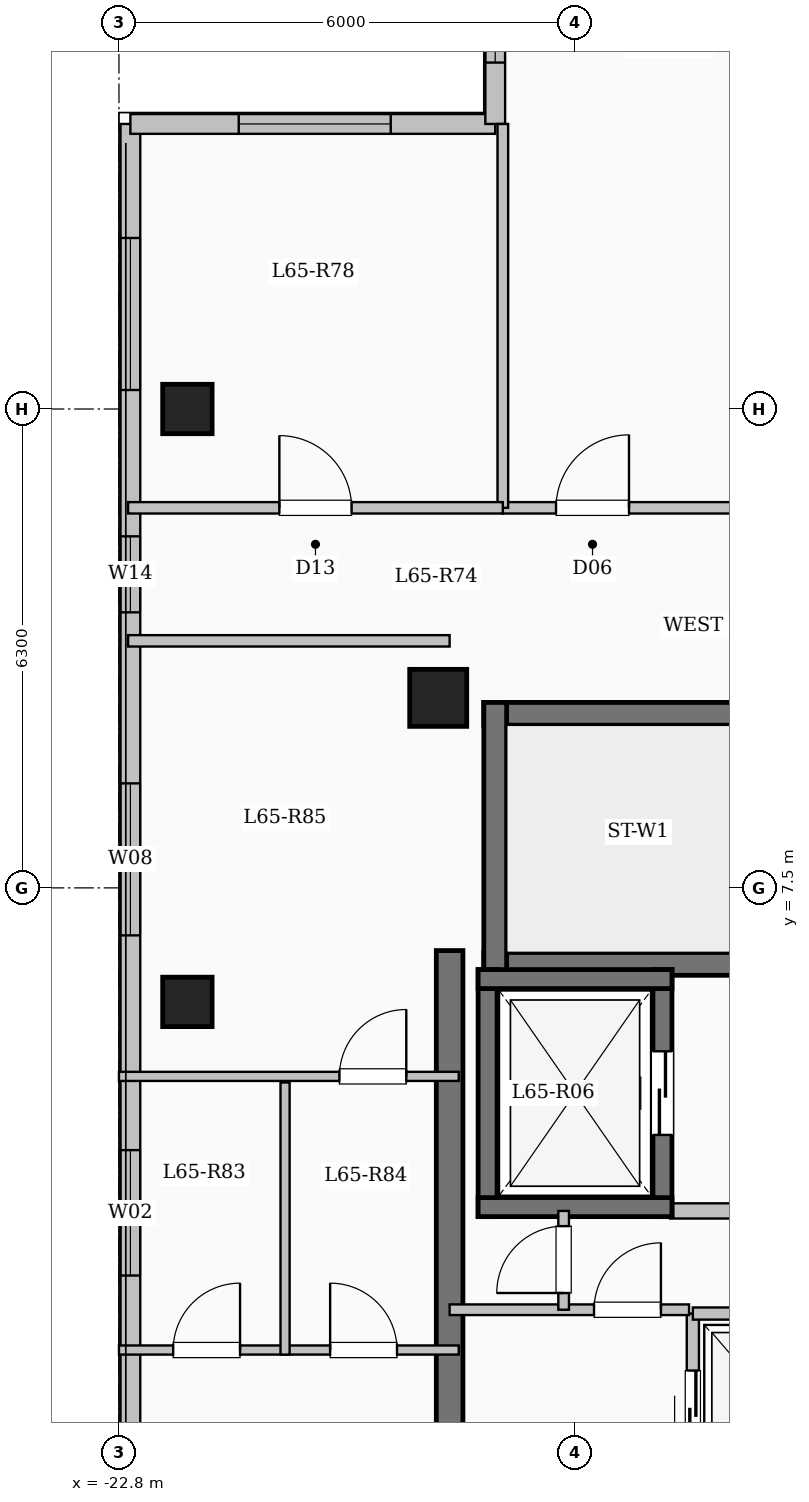
"""IFC4 building model, lengths in metres.
Left out: names, types, materials, properties, quantities, classifications, styles, units other than length and angle.
Written with IfcOpenShell. Run it as: python <this file> out.ifc"""

import sys

from ifc_helpers import new_model, si_unit, direction, frame, frame_2d, origin, origin_2d, place, context, subcontext, project, spatial, rectangle, extrude, element, fill, save


model = new_model("IFC4")
c1 = context("Model", 3, precision=1e-05, world=origin(), true_north=direction((0.0, 1.0)))
c2 = subcontext(c1, "Body", "Model", "MODEL_VIEW")
j1 = project(units=[si_unit("LENGTHUNIT", "METRE"), si_unit("PLANEANGLEUNIT", "RADIAN")], contexts=[c1])
p1 = place(None, origin())
s1 = spatial("IfcSite", under=j1, at=p1, CompositionType="ELEMENT")
p2 = place(p1, origin())
s2 = spatial("IfcBuilding", under=s1, at=p2, CompositionType="ELEMENT")
p3 = place(p2, frame((0.0, 0.0, 241.5)))
s3 = spatial("IfcBuildingStorey", under=s2, at=p3, CompositionType="ELEMENT", Elevation=241.5)
p4 = place(p3, frame((-18.6, 10.0, 0.0), z_axis=(0.0, 0.0, 1.0), x_axis=(1.0, 0.0, 0.0)))
e1 = element("IfcColumn", 1, at=p4, inside=s3, PredefinedType="COLUMN", context=c2, shape_type="SweptSolid", body=[
    extrude(rectangle(XDim=0.75, YDim=0.75, at=origin_2d()), origin(), (0.0, 0.0, 1.0), 3.35),
])
for number, where, z_axis, x_axis in (
    (2, (-21.9, 6.0, 0.0), (0.0, 0.0, 1.0), (1.0, 0.0, 0.0)),
    (3, (-21.9, 13.8, 0.0), (0.0, 0.0, 1.0), (1.0, 0.0, 0.0)),
):
    element("IfcColumn", number, at=place(p3, frame(where, z_axis=z_axis, x_axis=x_axis)), inside=s3, PredefinedType="COLUMN", context=c2, shape_type="SweptSolid", body=[
        extrude(rectangle(XDim=0.65, YDim=0.65, at=origin_2d()), origin(), (0.0, 0.0, 1.0), 3.35),
    ])
p5 = place(p3, frame((-22.65, -17.55, 0.0), z_axis=(0.0, 0.0, 1.0), x_axis=(0.0, 1.0, 0.0)))
e4 = element("IfcWall", 4, at=p5, inside=s3, PredefinedType="SOLIDWALL", context=c2, shape_type="SweptSolid", body=[
    extrude(rectangle(XDim=35.1, YDim=0.26, at=frame_2d((17.55, 0.0))), origin(), (0.0, 0.0, 1.0), 3.1),
])
p6 = place(p5, frame((2.975, 0.0, 0.9)))
e5 = element("IfcOpeningElement", 5, at=p6, cuts=e4, PredefinedType="OPENING", context=c2, shape_type="SweptSolid", body=[
    extrude(rectangle(XDim=2.2, YDim=1.75, at=frame_2d((1.1, 0.875))), frame((0.0, 0.14, 0.0), z_axis=(0.0, -1.0, 0.0), x_axis=(1.0, 0.0, 0.0)), (0.0, 0.0, 1.0), 0.28),
])
p7 = place(p5, frame((8.625, 0.0, 0.95)))
e6 = element("IfcOpeningElement", 6, at=p7, cuts=e4, PredefinedType="OPENING", context=c2, shape_type="SweptSolid", body=[
    extrude(rectangle(XDim=1.2, YDim=1.5, at=frame_2d((0.6, 0.75))), frame((0.0, 0.14, 0.0), z_axis=(0.0, -1.0, 0.0), x_axis=(1.0, 0.0, 0.0)), (0.0, 0.0, 1.0), 0.28),
])
p8 = place(p5, frame((13.55, 0.0, 0.9)))
e7 = element("IfcOpeningElement", 7, at=p8, cuts=e4, PredefinedType="OPENING", context=c2, shape_type="SweptSolid", body=[
    extrude(rectangle(XDim=2.2, YDim=1.75, at=frame_2d((1.1, 0.875))), frame((0.0, 0.14, 0.0), z_axis=(0.0, -1.0, 0.0), x_axis=(1.0, 0.0, 0.0)), (0.0, 0.0, 1.0), 0.28),
])
p9 = place(p5, frame((19.95, 0.0, 0.9)))
e8 = element("IfcOpeningElement", 8, at=p9, cuts=e4, PredefinedType="OPENING", context=c2, shape_type="SweptSolid", body=[
    extrude(rectangle(XDim=1.65, YDim=1.6, at=frame_2d((0.825, 0.8))), frame((0.0, 0.14, 0.0), z_axis=(0.0, -1.0, 0.0), x_axis=(1.0, 0.0, 0.0)), (0.0, 0.0, 1.0), 0.28),
])
p10 = place(p5, frame((24.425, 0.0, 0.9)))
e9 = element("IfcOpeningElement", 9, at=p10, cuts=e4, PredefinedType="OPENING", context=c2, shape_type="SweptSolid", body=[
    extrude(rectangle(XDim=2.0, YDim=1.7, at=frame_2d((1.0, 0.85))), frame((0.0, 0.14, 0.0), z_axis=(0.0, -1.0, 0.0), x_axis=(1.0, 0.0, 0.0)), (0.0, 0.0, 1.0), 0.28),
])
p11 = place(p5, frame((28.675, 0.0, 0.95)))
e10 = element("IfcOpeningElement", 10, at=p11, cuts=e4, PredefinedType="OPENING", context=c2, shape_type="SweptSolid", body=[
    extrude(rectangle(XDim=1.0, YDim=1.5, at=frame_2d((0.5, 0.75))), frame((0.0, 0.14, 0.0), z_axis=(0.0, -1.0, 0.0), x_axis=(1.0, 0.0, 0.0)), (0.0, 0.0, 1.0), 0.28),
])
p12 = place(p5, frame((31.6, 0.0, 0.9)))
e11 = element("IfcOpeningElement", 11, at=p12, cuts=e4, PredefinedType="OPENING", context=c2, shape_type="SweptSolid", body=[
    extrude(rectangle(XDim=2.0, YDim=1.7, at=frame_2d((1.0, 0.85))), frame((0.0, 0.14, 0.0), z_axis=(0.0, -1.0, 0.0), x_axis=(1.0, 0.0, 0.0)), (0.0, 0.0, 1.0), 0.28),
])
p13 = place(p3, frame((-22.65, 17.55, 0.0), z_axis=(0.0, 0.0, 1.0), x_axis=(1.0, 0.0, 0.0)))
e12 = element("IfcWall", 12, at=p13, inside=s3, PredefinedType="SOLIDWALL", context=c2, shape_type="SweptSolid", body=[
    extrude(rectangle(XDim=4.8, YDim=0.26, at=frame_2d((2.4, 0.0))), origin(), (0.0, 0.0, 1.0), 3.1),
])
p14 = place(p13, frame((1.425, 0.0, 0.9)))
e13 = element("IfcOpeningElement", 13, at=p14, cuts=e12, PredefinedType="OPENING", context=c2, shape_type="SweptSolid", body=[
    extrude(rectangle(XDim=2.0, YDim=1.7, at=frame_2d((1.0, 0.85))), frame((0.0, 0.14, 0.0), z_axis=(0.0, -1.0, 0.0), x_axis=(1.0, 0.0, 0.0)), (0.0, 0.0, 1.0), 0.28),
])
p15 = place(p3, frame((-17.85, 17.55, 0.0), z_axis=(0.0, 0.0, 1.0), x_axis=(0.0, 1.0, 0.0)))
e14 = element("IfcWall", 14, at=p15, inside=s3, PredefinedType="SOLIDWALL", context=c2, shape_type="SweptSolid", body=[
    extrude(rectangle(XDim=3.3, YDim=0.26, at=frame_2d((1.65, 0.0))), origin(), (0.0, 0.0, 1.0), 3.1),
])
p16 = place(p15, frame((0.808, 0.0, 0.9)))
e15 = element("IfcOpeningElement", 15, at=p16, cuts=e14, PredefinedType="OPENING", context=c2, shape_type="SweptSolid", body=[
    extrude(rectangle(XDim=1.65, YDim=1.6, at=frame_2d((0.825, 0.8))), frame((0.0, 0.14, 0.0), z_axis=(0.0, -1.0, 0.0), x_axis=(1.0, 0.0, 0.0)), (0.0, 0.0, 1.0), 0.28),
])
p17 = place(p3, frame((-18.0, 9.79, 0.0), z_axis=(0.0, 0.0, 1.0), x_axis=(1.0, 0.0, 0.0)))
e16 = element("IfcWall", 16, at=p17, inside=s3, PredefinedType="SHEAR", context=c2, shape_type="SweptSolid", body=[
    extrude(rectangle(XDim=8.0, YDim=0.3, at=frame_2d((4.0, 0.0))), origin(), (0.0, 0.0, 1.0), 3.35),
])
p18 = place(p3, frame((-18.0, 6.5, 0.0), z_axis=(0.0, 0.0, 1.0), x_axis=(1.0, 0.0, 0.0)))
e17 = element("IfcWall", 17, at=p18, inside=s3, PredefinedType="SHEAR", context=c2, shape_type="SweptSolid", body=[
    extrude(rectangle(XDim=8.0, YDim=0.3, at=frame_2d((4.0, 0.0))), origin(), (0.0, 0.0, 1.0), 3.35),
])
p19 = place(p18, frame((6.45, 0.0, 0.0)))
e18 = element("IfcOpeningElement", 18, at=p19, cuts=e17, PredefinedType="OPENING", context=c2, shape_type="SweptSolid", body=[
    extrude(rectangle(XDim=1.0, YDim=2.15, at=frame_2d((0.5, 1.075))), frame((0.0, 0.16, 0.0), z_axis=(0.0, -1.0, 0.0), x_axis=(1.0, 0.0, 0.0)), (0.0, 0.0, 1.0), 0.32),
])
p20 = place(p3, frame((-17.85, 6.35, 0.0), z_axis=(0.0, 0.0, 1.0), x_axis=(0.0, 1.0, 0.0)))
e19 = element("IfcWall", 19, at=p20, inside=s3, PredefinedType="SHEAR", context=c2, shape_type="SweptSolid", body=[
    extrude(rectangle(XDim=3.59, YDim=0.3, at=frame_2d((1.795, 0.0))), origin(), (0.0, 0.0, 1.0), 3.35),
])
p21 = place(p3, frame((-15.55, 3.25, 0.0), z_axis=(0.0, 0.0, 1.0), x_axis=(1.0, 0.0, 0.0)))
e20 = element("IfcWall", 20, at=p21, inside=s3, PredefinedType="SOLIDWALL", context=c2, shape_type="SweptSolid", body=[
    extrude(rectangle(XDim=5.4, YDim=0.2, at=frame_2d((2.7, 0.0))), origin(), (0.0, 0.0, 1.0), 3.1),
])
p22 = place(p3, frame((-17.95, 3.175, 0.0), z_axis=(0.0, 0.0, 1.0), x_axis=(0.0, 1.0, 0.0)))
e21 = element("IfcWall", 21, at=p22, inside=s3, PredefinedType="SHEAR", context=c2, shape_type="SweptSolid", body=[
    extrude(rectangle(XDim=3.25, YDim=0.25, at=frame_2d((1.625, 0.0))), origin(), (0.0, 0.0, 1.0), 3.35),
])
p23 = place(p3, frame((-15.65, 3.175, 0.0), z_axis=(0.0, 0.0, 1.0), x_axis=(0.0, 1.0, 0.0)))
e22 = element("IfcWall", 22, at=p23, inside=s3, PredefinedType="SHEAR", context=c2, shape_type="SweptSolid", body=[
    extrude(rectangle(XDim=3.25, YDim=0.25, at=frame_2d((1.625, 0.0))), origin(), (0.0, 0.0, 1.0), 3.35),
])
p24 = place(p23, frame((1.075, 0.0, 0.0)))
e23 = element("IfcOpeningElement", 23, at=p24, cuts=e22, PredefinedType="OPENING", context=c2, shape_type="SweptSolid", body=[
    extrude(rectangle(XDim=1.1, YDim=2.15, at=frame_2d((0.55, 1.075))), frame((0.0, 0.135, 0.0), z_axis=(0.0, -1.0, 0.0), x_axis=(1.0, 0.0, 0.0)), (0.0, 0.0, 1.0), 0.27),
])
for number, where, z_axis, x_axis in (
    (24, (-18.075, 3.3, 0.0), (0.0, 0.0, 1.0), (1.0, 0.0, 0.0)),
    (25, (-18.075, 6.3, 0.0), (0.0, 0.0, 1.0), (1.0, 0.0, 0.0)),
):
    element("IfcWall", number, at=place(p3, frame(where, z_axis=z_axis, x_axis=x_axis)), inside=s3, PredefinedType="SHEAR", context=c2, shape_type="SweptSolid", body=[
        extrude(rectangle(XDim=2.55, YDim=0.25, at=frame_2d((1.275, 0.0))), origin(), (0.0, 0.0, 1.0), 3.35),
    ])
p25 = place(p3, frame((-15.25, -0.7, 0.0), z_axis=(0.0, 0.0, 1.0), x_axis=(0.0, 1.0, 0.0)))
e26 = element("IfcWall", 26, at=p25, inside=s3, PredefinedType="SOLIDWALL", context=c2, shape_type="SweptSolid", body=[
    extrude(rectangle(XDim=2.6, YDim=0.16, at=frame_2d((1.3, 0.0))), origin(), (0.0, 0.0, 1.0), 3.1),
])
p26 = place(p25, frame((0.75, 0.0, 0.0)))
e27 = element("IfcOpeningElement", 27, at=p26, cuts=e26, PredefinedType="OPENING", context=c2, shape_type="SweptSolid", body=[
    extrude(rectangle(XDim=1.1, YDim=2.15, at=frame_2d((0.55, 1.075))), frame((0.0, 0.09, 0.0), z_axis=(0.0, -1.0, 0.0), x_axis=(1.0, 0.0, 0.0)), (0.0, 0.0, 1.0), 0.18),
])
p27 = place(p3, frame((-15.25, 1.9, 0.0), z_axis=(0.0, 0.0, 1.0), x_axis=(1.0, 0.0, 0.0)))
e28 = element("IfcWall", 28, at=p27, inside=s3, PredefinedType="SOLIDWALL", context=c2, shape_type="SweptSolid", body=[
    extrude(rectangle(XDim=2.3, YDim=0.16, at=frame_2d((1.15, 0.0))), origin(), (0.0, 0.0, 1.0), 3.1),
])
p28 = place(p3, frame((-18.45, -7.375, 0.0), z_axis=(0.0, 0.0, 1.0), x_axis=(0.0, 1.0, 0.0)))
e29 = element("IfcWall", 29, at=p28, inside=s3, PredefinedType="SHEAR", context=c2, shape_type="SweptSolid", body=[
    extrude(rectangle(XDim=14.05, YDim=0.35, at=frame_2d((7.025, 0.0))), origin(), (0.0, 0.0, 1.0), 3.35),
])
p29 = place(p3, frame((-18.45, 1.95, 0.0), z_axis=(0.0, 0.0, 1.0), x_axis=(1.0, 0.0, 0.0)))
e30 = element("IfcWall", 30, at=p29, inside=s3, PredefinedType="PARTITIONING", context=c2, shape_type="SweptSolid", body=[
    extrude(rectangle(XDim=3.15, YDim=0.14, at=frame_2d((1.575, 0.0))), origin(), (0.0, 0.0, 1.0), 3.1),
])
p30 = place(p29, frame((1.9, 0.0, 0.0)))
e31 = element("IfcOpeningElement", 31, at=p30, cuts=e30, PredefinedType="OPENING", context=c2, shape_type="SweptSolid", body=[
    extrude(rectangle(XDim=0.88, YDim=2.1, at=frame_2d((0.44, 1.05))), frame((0.0, 0.08, 0.0), z_axis=(0.0, -1.0, 0.0), x_axis=(1.0, 0.0, 0.0)), (0.0, 0.0, 1.0), 0.16),
])
p31 = place(p3, frame((-16.95, 1.95, 0.0), z_axis=(0.0, 0.0, 1.0), x_axis=(0.0, 1.0, 0.0)))
e32 = element("IfcWall", 32, at=p31, inside=s3, PredefinedType="PARTITIONING", context=c2, shape_type="SweptSolid", body=[
    extrude(rectangle(XDim=1.3, YDim=0.14, at=frame_2d((0.65, 0.0))), origin(), (0.0, 0.0, 1.0), 3.1),
])
p32 = place(p31, frame((0.22, 0.0, 0.0)))
e33 = element("IfcOpeningElement", 33, at=p32, cuts=e32, PredefinedType="OPENING", context=c2, shape_type="SweptSolid", body=[
    extrude(rectangle(XDim=0.88, YDim=2.1, at=frame_2d((0.44, 1.05))), frame((0.0, 0.08, 0.0), z_axis=(0.0, -1.0, 0.0), x_axis=(1.0, 0.0, 0.0)), (0.0, 0.0, 1.0), 0.16),
])
p33 = place(p3, frame((-17.75, 12.5, 0.0), z_axis=(0.0, 0.0, 1.0), x_axis=(1.0, 0.0, 0.0)))
e34 = element("IfcWall", 34, at=p33, inside=s3, PredefinedType="PARTITIONING", context=c2, shape_type="SweptSolid", body=[
    extrude(rectangle(XDim=13.9, YDim=0.15, at=frame_2d((6.95, 0.0))), origin(), (0.0, 0.0, 1.0), 3.1),
])
p34 = place(p33, frame((0.7, 0.0, 0.0)))
e35 = element("IfcOpeningElement", 35, at=p34, cuts=e34, PredefinedType="OPENING", context=c2, shape_type="SweptSolid", body=[
    extrude(rectangle(XDim=0.96, YDim=2.15, at=frame_2d((0.48, 1.075))), frame((0.0, 0.085, 0.0), z_axis=(0.0, -1.0, 0.0), x_axis=(1.0, 0.0, 0.0)), (0.0, 0.0, 1.0), 0.17),
])
p35 = place(p33, frame((9.484, 0.0, 0.0)))
e36 = element("IfcOpeningElement", 36, at=p35, cuts=e34, PredefinedType="OPENING", context=c2, shape_type="SweptSolid", body=[
    extrude(rectangle(XDim=0.96, YDim=2.15, at=frame_2d((0.48, 1.075))), frame((0.0, 0.085, 0.0), z_axis=(0.0, -1.0, 0.0), x_axis=(1.0, 0.0, 0.0)), (0.0, 0.0, 1.0), 0.17),
])
p36 = place(p3, frame((-22.68, 10.75, 0.0), z_axis=(0.0, 0.0, 1.0), x_axis=(1.0, 0.0, 0.0)))
e37 = element("IfcWall", 37, at=p36, inside=s3, PredefinedType="PARTITIONING", context=c2, shape_type="SweptSolid", body=[
    extrude(rectangle(XDim=4.23, YDim=0.15, at=frame_2d((2.115, 0.0))), origin(), (0.0, 0.0, 1.0), 3.1),
])
p37 = place(p3, frame((-17.75, 12.5, 0.0), z_axis=(0.0, 0.0, 1.0), x_axis=(0.0, 1.0, 0.0)))
e38 = element("IfcWall", 38, at=p37, inside=s3, PredefinedType="PARTITIONING", context=c2, shape_type="SweptSolid", body=[
    extrude(rectangle(XDim=5.05, YDim=0.14, at=frame_2d((2.525, 0.0))), origin(), (0.0, 0.0, 1.0), 3.1),
])
p38 = place(p3, frame((-22.68, 12.5, 0.0), z_axis=(0.0, 0.0, 1.0), x_axis=(1.0, 0.0, 0.0)))
e39 = element("IfcWall", 39, at=p38, inside=s3, PredefinedType="PARTITIONING", context=c2, shape_type="SweptSolid", body=[
    extrude(rectangle(XDim=4.93, YDim=0.15, at=frame_2d((2.465, 0.0))), origin(), (0.0, 0.0, 1.0), 3.1),
])
p39 = place(p38, frame((1.99, 0.0, 0.0)))
e40 = element("IfcOpeningElement", 40, at=p39, cuts=e39, PredefinedType="OPENING", context=c2, shape_type="SweptSolid", body=[
    extrude(rectangle(XDim=0.95, YDim=2.15, at=frame_2d((0.475, 1.075))), frame((0.0, 0.085, 0.0), z_axis=(0.0, -1.0, 0.0), x_axis=(1.0, 0.0, 0.0)), (0.0, 0.0, 1.0), 0.17),
])
p40 = place(p3, frame((-22.8, 1.42, 0.0), z_axis=(0.0, 0.0, 1.0), x_axis=(1.0, 0.0, 0.0)))
e41 = element("IfcWall", 41, at=p40, inside=s3, PredefinedType="PARTITIONING", context=c2, shape_type="SweptSolid", body=[
    extrude(rectangle(XDim=4.47, YDim=0.12, at=frame_2d((2.235, 0.0))), origin(), (0.0, 0.0, 1.0), 3.1),
])
p41 = place(p40, frame((0.713, 0.0, 0.0)))
e42 = element("IfcOpeningElement", 42, at=p41, cuts=e41, PredefinedType="OPENING", context=c2, shape_type="SweptSolid", body=[
    extrude(rectangle(XDim=0.88, YDim=2.1, at=frame_2d((0.44, 1.05))), frame((0.0, 0.07, 0.0), z_axis=(0.0, -1.0, 0.0), x_axis=(1.0, 0.0, 0.0)), (0.0, 0.0, 1.0), 0.14),
])
p42 = place(p40, frame((2.778, 0.0, 0.0)))
e43 = element("IfcOpeningElement", 43, at=p42, cuts=e41, PredefinedType="OPENING", context=c2, shape_type="SweptSolid", body=[
    extrude(rectangle(XDim=0.88, YDim=2.1, at=frame_2d((0.44, 1.05))), frame((0.0, 0.07, 0.0), z_axis=(0.0, -1.0, 0.0), x_axis=(1.0, 0.0, 0.0)), (0.0, 0.0, 1.0), 0.14),
])
p43 = place(p3, frame((-22.8, 5.02, 0.0), z_axis=(0.0, 0.0, 1.0), x_axis=(1.0, 0.0, 0.0)))
e44 = element("IfcWall", 44, at=p43, inside=s3, PredefinedType="PARTITIONING", context=c2, shape_type="SweptSolid", body=[
    extrude(rectangle(XDim=4.47, YDim=0.12, at=frame_2d((2.235, 0.0))), origin(), (0.0, 0.0, 1.0), 3.1),
])
p44 = place(p43, frame((2.9, 0.0, 0.0)))
e45 = element("IfcOpeningElement", 45, at=p44, cuts=e44, PredefinedType="OPENING", context=c2, shape_type="SweptSolid", body=[
    extrude(rectangle(XDim=0.88, YDim=2.1, at=frame_2d((0.44, 1.05))), frame((0.0, 0.07, 0.0), z_axis=(0.0, -1.0, 0.0), x_axis=(1.0, 0.0, 0.0)), (0.0, 0.0, 1.0), 0.14),
])
p45 = place(p3, frame((-20.615, 1.36, 0.0), z_axis=(0.0, 0.0, 1.0), x_axis=(0.0, 1.0, 0.0)))
e46 = element("IfcWall", 46, at=p45, inside=s3, PredefinedType="PARTITIONING", context=c2, shape_type="SweptSolid", body=[
    extrude(rectangle(XDim=3.58, YDim=0.12, at=frame_2d((1.79, 0.0))), origin(), (0.0, 0.0, 1.0), 3.1),
])
p46 = place(p9, origin())
e47 = element("IfcWindow", 47, at=p46, inside=s3, PartitioningType="SINGLE_PANEL", PredefinedType="WINDOW", context=c2, shape_type="SweptSolid", body=[
    extrude(rectangle(XDim=1.65, YDim=1.6, at=frame_2d((0.825, 0.8))), frame((0.0, 0.03, 0.0), z_axis=(0.0, -1.0, 0.0), x_axis=(1.0, 0.0, 0.0)), (0.0, 0.0, 1.0), 0.06),
])
fill(e8, e47)
p47 = place(p10, origin())
e48 = element("IfcWindow", 48, at=p47, inside=s3, PartitioningType="SINGLE_PANEL", PredefinedType="WINDOW", context=c2, shape_type="SweptSolid", body=[
    extrude(rectangle(XDim=2.0, YDim=1.7, at=frame_2d((1.0, 0.85))), frame((0.0, 0.03, 0.0), z_axis=(0.0, -1.0, 0.0), x_axis=(1.0, 0.0, 0.0)), (0.0, 0.0, 1.0), 0.06),
])
fill(e9, e48)
p48 = place(p11, origin())
e49 = element("IfcWindow", 49, at=p48, inside=s3, PartitioningType="SINGLE_PANEL", PredefinedType="WINDOW", context=c2, shape_type="SweptSolid", body=[
    extrude(rectangle(XDim=1.0, YDim=1.5, at=frame_2d((0.5, 0.75))), frame((0.0, 0.03, 0.0), z_axis=(0.0, -1.0, 0.0), x_axis=(1.0, 0.0, 0.0)), (0.0, 0.0, 1.0), 0.06),
])
fill(e10, e49)
p49 = place(p12, origin())
e50 = element("IfcWindow", 50, at=p49, inside=s3, PartitioningType="SINGLE_PANEL", PredefinedType="WINDOW", context=c2, shape_type="SweptSolid", body=[
    extrude(rectangle(XDim=2.0, YDim=1.7, at=frame_2d((1.0, 0.85))), frame((0.0, 0.03, 0.0), z_axis=(0.0, -1.0, 0.0), x_axis=(1.0, 0.0, 0.0)), (0.0, 0.0, 1.0), 0.06),
])
fill(e11, e50)
p50 = place(p14, origin())
e51 = element("IfcWindow", 51, at=p50, inside=s3, PartitioningType="SINGLE_PANEL", PredefinedType="WINDOW", context=c2, shape_type="SweptSolid", body=[
    extrude(rectangle(XDim=2.0, YDim=1.7, at=frame_2d((1.0, 0.85))), frame((0.0, 0.03, 0.0), z_axis=(0.0, -1.0, 0.0), x_axis=(1.0, 0.0, 0.0)), (0.0, 0.0, 1.0), 0.06),
])
fill(e13, e51)
p51 = place(p16, origin())
e52 = element("IfcWindow", 52, at=p51, inside=s3, PartitioningType="SINGLE_PANEL", PredefinedType="WINDOW", context=c2, shape_type="SweptSolid", body=[
    extrude(rectangle(XDim=1.65, YDim=1.6, at=frame_2d((0.825, 0.8))), frame((0.0, 0.03, 0.0), z_axis=(0.0, -1.0, 0.0), x_axis=(1.0, 0.0, 0.0)), (0.0, 0.0, 1.0), 0.06),
])
fill(e15, e52)
p52 = place(p24, origin())
e53 = element("IfcDoor", 53, at=p52, inside=s3, OperationType="SLIDING_TO_LEFT", PredefinedType="DOOR", context=c2, shape_type="SweptSolid", body=[
    extrude(rectangle(XDim=1.1, YDim=2.15, at=frame_2d((0.55, 1.075))), frame((0.0, 0.025, 0.0), z_axis=(0.0, -1.0, 0.0), x_axis=(1.0, 0.0, 0.0)), (0.0, 0.0, 1.0), 0.05),
])
fill(e23, e53)
p53 = place(p26, origin())
e54 = element("IfcDoor", 54, at=p53, inside=s3, OperationType="SLIDING_TO_LEFT", PredefinedType="DOOR", context=c2, shape_type="SweptSolid", body=[
    extrude(rectangle(XDim=1.1, YDim=2.15, at=frame_2d((0.55, 1.075))), frame((0.0, 0.025, 0.0), z_axis=(0.0, -1.0, 0.0), x_axis=(1.0, 0.0, 0.0)), (0.0, 0.0, 1.0), 0.05),
])
fill(e27, e54)
p54 = place(p30, origin())
e55 = element("IfcDoor", 55, at=p54, inside=s3, OperationType="SINGLE_SWING_RIGHT", PredefinedType="DOOR", context=c2, shape_type="SweptSolid", body=[
    extrude(rectangle(XDim=0.88, YDim=2.1, at=frame_2d((0.44, 1.05))), frame((0.0, 0.025, 0.0), z_axis=(0.0, -1.0, 0.0), x_axis=(1.0, 0.0, 0.0)), (0.0, 0.0, 1.0), 0.05),
])
fill(e31, e55)
p55 = place(p32, origin())
e56 = element("IfcDoor", 56, at=p55, inside=s3, OperationType="SINGLE_SWING_LEFT", PredefinedType="DOOR", context=c2, shape_type="SweptSolid", body=[
    extrude(rectangle(XDim=0.88, YDim=2.1, at=frame_2d((0.44, 1.05))), frame((0.0, 0.025, 0.0), z_axis=(0.0, -1.0, 0.0), x_axis=(1.0, 0.0, 0.0)), (0.0, 0.0, 1.0), 0.05),
])
fill(e33, e56)
p56 = place(p34, origin())
e57 = element("IfcDoor", 57, at=p56, inside=s3, OperationType="SINGLE_SWING_RIGHT", PredefinedType="DOOR", context=c2, shape_type="SweptSolid", body=[
    extrude(rectangle(XDim=0.96, YDim=2.15, at=frame_2d((0.48, 1.075))), frame((0.0, 0.025, 0.0), z_axis=(0.0, -1.0, 0.0), x_axis=(1.0, 0.0, 0.0)), (0.0, 0.0, 1.0), 0.05),
])
fill(e35, e57)
p57 = place(p39, origin())
e58 = element("IfcDoor", 58, at=p57, inside=s3, OperationType="SINGLE_SWING_LEFT", PredefinedType="DOOR", context=c2, shape_type="SweptSolid", body=[
    extrude(rectangle(XDim=0.95, YDim=2.15, at=frame_2d((0.475, 1.075))), frame((0.0, 0.025, 0.0), z_axis=(0.0, -1.0, 0.0), x_axis=(1.0, 0.0, 0.0)), (0.0, 0.0, 1.0), 0.05),
])
fill(e40, e58)
p58 = place(p41, origin())
e59 = element("IfcDoor", 59, at=p58, inside=s3, OperationType="SINGLE_SWING_RIGHT", PredefinedType="DOOR", context=c2, shape_type="SweptSolid", body=[
    extrude(rectangle(XDim=0.88, YDim=2.1, at=frame_2d((0.44, 1.05))), frame((0.0, 0.025, 0.0), z_axis=(0.0, -1.0, 0.0), x_axis=(1.0, 0.0, 0.0)), (0.0, 0.0, 1.0), 0.05),
])
fill(e42, e59)
p59 = place(p42, origin())
e60 = element("IfcDoor", 60, at=p59, inside=s3, OperationType="SINGLE_SWING_LEFT", PredefinedType="DOOR", context=c2, shape_type="SweptSolid", body=[
    extrude(rectangle(XDim=0.88, YDim=2.1, at=frame_2d((0.44, 1.05))), frame((0.0, 0.025, 0.0), z_axis=(0.0, -1.0, 0.0), x_axis=(1.0, 0.0, 0.0)), (0.0, 0.0, 1.0), 0.05),
])
fill(e43, e60)
p60 = place(p44, origin())
e61 = element("IfcDoor", 61, at=p60, inside=s3, OperationType="SINGLE_SWING_RIGHT", PredefinedType="DOOR", context=c2, shape_type="SweptSolid", body=[
    extrude(rectangle(XDim=0.88, YDim=2.1, at=frame_2d((0.44, 1.05))), frame((0.0, 0.025, 0.0), z_axis=(0.0, -1.0, 0.0), x_axis=(1.0, 0.0, 0.0)), (0.0, 0.0, 1.0), 0.05),
])
fill(e45, e61)
save(model, sys.argv[1])
